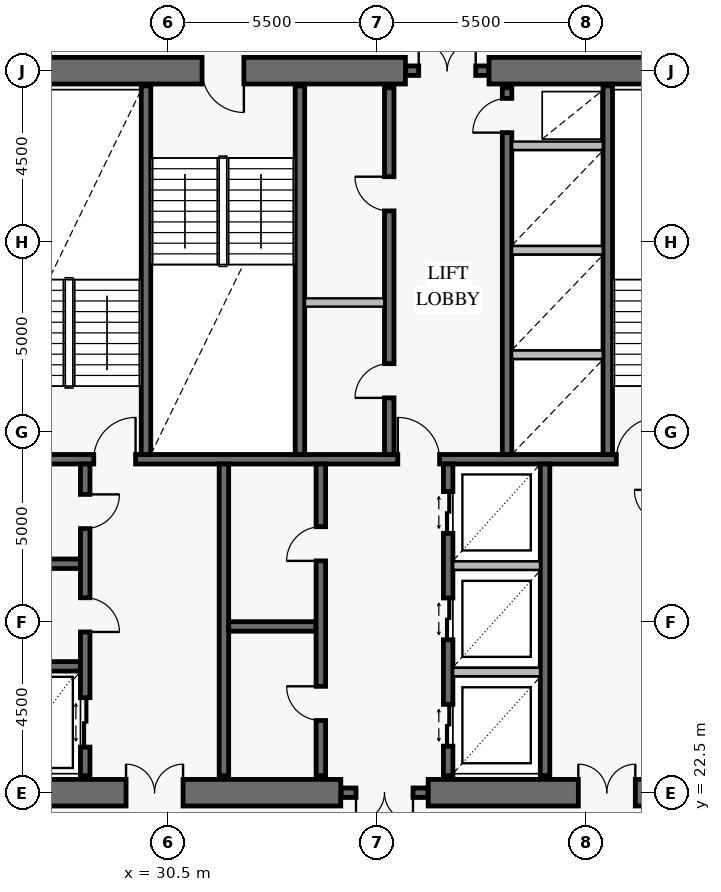
"""IFC4 building model, lengths in metres.
Left out: names, types, materials, properties, quantities, classifications, styles, units other than length and angle.
Written with IfcOpenShell. Run it as: python <this file> out.ifc"""

import sys

from ifc_helpers import new_model, si_unit, direction, frame, frame_2d, origin, place, context, subcontext, project, spatial, rectangle, extrude, element, fill, save


model = new_model("IFC4")
c1 = context("Model", 3, precision=1e-05, world=origin(), true_north=direction((0.0, 1.0)))
c2 = subcontext(c1, "Body", "Model", "MODEL_VIEW")
j1 = project(units=[si_unit("LENGTHUNIT", "METRE"), si_unit("PLANEANGLEUNIT", "RADIAN")], contexts=[c1])
p1 = place(None, origin())
s1 = spatial("IfcSite", under=j1, at=p1, CompositionType="ELEMENT")
p2 = place(p1, origin())
s2 = spatial("IfcBuilding", under=s1, at=p2, CompositionType="ELEMENT")
p3 = place(p2, frame((0.0, 0.0, 150.4)))
s3 = spatial("IfcBuildingStorey", under=s2, at=p3, CompositionType="ELEMENT", Elevation=150.4)
p4 = place(p3, frame((25.15, 22.5, 0.0), z_axis=(0.0, 0.0, 1.0), x_axis=(1.0, 0.0, 0.0)))
e1 = element("IfcWall", 1, at=p4, inside=s3, PredefinedType="SHEAR", context=c2, shape_type="SweptSolid", body=[
    extrude(rectangle(XDim=9.9, YDim=0.7, at=frame_2d((4.95, 0.0))), origin(), (0.0, 0.0, 1.0), 3.8),
])
p5 = place(p4, frame((4.25, 0.0, 0.0)))
e2 = element("IfcOpeningElement", 2, at=p5, cuts=e1, PredefinedType="OPENING", context=c2, shape_type="SweptSolid", body=[
    extrude(rectangle(XDim=1.5, YDim=2.15, at=frame_2d((0.75, 1.075))), frame((0.0, 0.362, 0.0), z_axis=(0.0, -1.0, 0.0), x_axis=(1.0, 0.0, 0.0)), (0.0, 0.0, 1.0), 0.724),
])
p6 = place(p3, frame((37.35, 22.5, 0.0), z_axis=(0.0, 0.0, 1.0), x_axis=(1.0, 0.0, 0.0)))
e3 = element("IfcWall", 3, at=p6, inside=s3, PredefinedType="SHEAR", context=c2, shape_type="SweptSolid", body=[
    extrude(rectangle(XDim=9.5, YDim=0.7, at=frame_2d((4.75, 0.0))), origin(), (0.0, 0.0, 1.0), 3.8),
])
p7 = place(p6, frame((3.95, 0.0, 0.0)))
e4 = element("IfcOpeningElement", 4, at=p7, cuts=e3, PredefinedType="OPENING", context=c2, shape_type="SweptSolid", body=[
    extrude(rectangle(XDim=1.5, YDim=2.15, at=frame_2d((0.75, 1.075))), frame((0.0, 0.362, 0.0), z_axis=(0.0, -1.0, 0.0), x_axis=(1.0, 0.0, 0.0)), (0.0, 0.0, 1.0), 0.724),
])
p8 = place(p3, frame((46.85, 41.5, 0.0), z_axis=(0.0, 0.0, 1.0), x_axis=(-1.0, 0.0, 0.0)))
e5 = element("IfcWall", 5, at=p8, inside=s3, PredefinedType="SHEAR", context=c2, shape_type="SweptSolid", body=[
    extrude(rectangle(XDim=7.9, YDim=0.7, at=frame_2d((3.95, 0.0))), origin(), (0.0, 0.0, 1.0), 3.8),
])
p9 = place(p3, frame((36.75, 41.5, 0.0), z_axis=(0.0, 0.0, 1.0), x_axis=(-1.0, 0.0, 0.0)))
e6 = element("IfcWall", 6, at=p9, inside=s3, PredefinedType="SHEAR", context=c2, shape_type="SweptSolid", body=[
    extrude(rectangle(XDim=11.6, YDim=0.7, at=frame_2d((5.8, 0.0))), origin(), (0.0, 0.0, 1.0), 3.8),
])
p10 = place(p9, frame((4.25, 0.0, 0.0)))
e7 = element("IfcOpeningElement", 7, at=p10, cuts=e6, PredefinedType="OPENING", context=c2, shape_type="SweptSolid", body=[
    extrude(rectangle(XDim=1.1, YDim=2.15, at=frame_2d((0.55, 1.075))), frame((0.0, 0.362, 0.0), z_axis=(0.0, -1.0, 0.0), x_axis=(1.0, 0.0, 0.0)), (0.0, 0.0, 1.0), 0.724),
])
p11 = place(p3, frame((35.06, 22.5, 0.0), z_axis=(0.0, 0.0, 1.0), x_axis=(1.0, 0.0, 0.0)))
e8 = element("IfcWall", 8, at=p11, inside=s3, PredefinedType="SOLIDWALL", context=c2, shape_type="SweptSolid", body=[
    extrude(rectangle(XDim=2.28, YDim=0.25, at=frame_2d((1.14, 0.0))), origin(), (0.0, 0.0, 1.0), 3.8),
])
p12 = place(p11, frame((0.39, 0.0, 0.0)))
e9 = element("IfcOpeningElement", 9, at=p12, cuts=e8, PredefinedType="OPENING", context=c2, shape_type="SweptSolid", body=[
    extrude(rectangle(XDim=1.5, YDim=2.15, at=frame_2d((0.75, 1.075))), frame((0.0, 0.137, 0.0), z_axis=(0.0, -1.0, 0.0), x_axis=(1.0, 0.0, 0.0)), (0.0, 0.0, 1.0), 0.274),
])
p13 = place(p3, frame((36.76, 41.5, 0.0), z_axis=(0.0, 0.0, 1.0), x_axis=(1.0, 0.0, 0.0)))
e10 = element("IfcWall", 10, at=p13, inside=s3, PredefinedType="SOLIDWALL", context=c2, shape_type="SweptSolid", body=[
    extrude(rectangle(XDim=2.18, YDim=0.25, at=frame_2d((1.09, 0.0))), origin(), (0.0, 0.0, 1.0), 3.8),
])
p14 = place(p13, frame((0.34, 0.0, 0.0)))
e11 = element("IfcOpeningElement", 11, at=p14, cuts=e10, PredefinedType="OPENING", context=c2, shape_type="SweptSolid", body=[
    extrude(rectangle(XDim=1.5, YDim=2.15, at=frame_2d((0.75, 1.075))), frame((0.0, 0.137, 0.0), z_axis=(0.0, -1.0, 0.0), x_axis=(1.0, 0.0, 0.0)), (0.0, 0.0, 1.0), 0.274),
])
p15 = place(p3, frame((25.95, 31.275, 0.0), z_axis=(0.0, 0.0, 1.0), x_axis=(1.0, 0.0, 0.0)))
e12 = element("IfcWall", 12, at=p15, inside=s3, PredefinedType="SOLIDWALL", context=c2, shape_type="SweptSolid", body=[
    extrude(rectangle(XDim=20.1, YDim=0.25, at=frame_2d((10.05, 0.0))), origin(), (0.0, 0.0, 1.0), 3.8),
])
p16 = place(p15, frame((2.6, 0.0, 0.0)))
e13 = element("IfcOpeningElement", 13, at=p16, cuts=e12, PredefinedType="OPENING", context=c2, shape_type="SweptSolid", body=[
    extrude(rectangle(XDim=1.1, YDim=2.15, at=frame_2d((0.55, 1.075))), frame((0.0, 0.137, 0.0), z_axis=(0.0, -1.0, 0.0), x_axis=(1.0, 0.0, 0.0)), (0.0, 0.0, 1.0), 0.274),
])
p17 = place(p15, frame((10.6, 0.0, 0.0)))
e14 = element("IfcOpeningElement", 14, at=p17, cuts=e12, PredefinedType="OPENING", context=c2, shape_type="SweptSolid", body=[
    extrude(rectangle(XDim=1.1, YDim=2.15, at=frame_2d((0.55, 1.075))), frame((0.0, 0.137, 0.0), z_axis=(0.0, -1.0, 0.0), x_axis=(1.0, 0.0, 0.0)), (0.0, 0.0, 1.0), 0.274),
])
p18 = place(p15, frame((16.35, 0.0, 0.0)))
e15 = element("IfcOpeningElement", 15, at=p18, cuts=e12, PredefinedType="OPENING", context=c2, shape_type="SweptSolid", body=[
    extrude(rectangle(XDim=1.1, YDim=2.15, at=frame_2d((0.55, 1.075))), frame((0.0, 0.137, 0.0), z_axis=(0.0, -1.0, 0.0), x_axis=(1.0, 0.0, 0.0)), (0.0, 0.0, 1.0), 0.274),
])
for number, where, z_axis, x_axis in (
    (16, (29.925, 31.4, 0.0), (0.0, 0.0, 1.0), (0.0, 1.0, 0.0)),
    (17, (33.975, 31.4, 0.0), (0.0, 0.0, 1.0), (0.0, 1.0, 0.0)),
    (18, (42.075, 31.4, 0.0), (0.0, 0.0, 1.0), (0.0, 1.0, 0.0)),
):
    element("IfcWall", number, at=place(p3, frame(where, z_axis=z_axis, x_axis=x_axis)), inside=s3, PredefinedType="SOLIDWALL", context=c2, shape_type="SweptSolid", body=[
        extrude(rectangle(XDim=9.7, YDim=0.25, at=frame_2d((4.85, 0.0))), origin(), (0.0, 0.0, 1.0), 3.8),
    ])
p19 = place(p3, frame((36.325, 31.4, 0.0), z_axis=(0.0, 0.0, 1.0), x_axis=(0.0, 1.0, 0.0)))
e19 = element("IfcWall", 19, at=p19, inside=s3, PredefinedType="SOLIDWALL", context=c2, shape_type="SweptSolid", body=[
    extrude(rectangle(XDim=9.65, YDim=0.25, at=frame_2d((4.825, 0.0))), origin(), (0.0, 0.0, 1.0), 3.8),
])
p20 = place(p19, frame((1.49, 0.0, 0.0)))
e20 = element("IfcOpeningElement", 20, at=p20, cuts=e19, PredefinedType="OPENING", context=c2, shape_type="SweptSolid", body=[
    extrude(rectangle(XDim=0.9, YDim=2.1, at=frame_2d((0.45, 1.05))), frame((0.0, 0.137, 0.0), z_axis=(0.0, -1.0, 0.0), x_axis=(1.0, 0.0, 0.0)), (0.0, 0.0, 1.0), 0.274),
])
p21 = place(p19, frame((6.41, 0.0, 0.0)))
e21 = element("IfcOpeningElement", 21, at=p21, cuts=e19, PredefinedType="OPENING", context=c2, shape_type="SweptSolid", body=[
    extrude(rectangle(XDim=0.9, YDim=2.1, at=frame_2d((0.45, 1.05))), frame((0.0, 0.137, 0.0), z_axis=(0.0, -1.0, 0.0), x_axis=(1.0, 0.0, 0.0)), (0.0, 0.0, 1.0), 0.274),
])
p22 = place(p3, frame((39.425, 31.4, 0.0), z_axis=(0.0, 0.0, 1.0), x_axis=(0.0, 1.0, 0.0)))
e22 = element("IfcWall", 22, at=p22, inside=s3, PredefinedType="SOLIDWALL", context=c2, shape_type="SweptSolid", body=[
    extrude(rectangle(XDim=9.65, YDim=0.25, at=frame_2d((4.825, 0.0))), origin(), (0.0, 0.0, 1.0), 3.8),
])
p23 = place(p22, frame((8.47, 0.0, 0.0)))
e23 = element("IfcOpeningElement", 23, at=p23, cuts=e22, PredefinedType="OPENING", context=c2, shape_type="SweptSolid", body=[
    extrude(rectangle(XDim=0.9, YDim=2.1, at=frame_2d((0.45, 1.05))), frame((0.0, 0.137, 0.0), z_axis=(0.0, -1.0, 0.0), x_axis=(1.0, 0.0, 0.0)), (0.0, 0.0, 1.0), 0.274),
])
for number, where, z_axis, x_axis in (
    (24, (25.95, 25.825, 0.0), (0.0, 0.0, 1.0), (1.0, 0.0, 0.0)),
    (25, (25.95, 28.525, 0.0), (0.0, 0.0, 1.0), (1.0, 0.0, 0.0)),
):
    element("IfcWall", number, at=place(p3, frame(where, z_axis=z_axis, x_axis=x_axis)), inside=s3, PredefinedType="SOLIDWALL", context=c2, shape_type="SweptSolid", body=[
        extrude(rectangle(XDim=2.25, YDim=0.25, at=frame_2d((1.125, 0.0))), origin(), (0.0, 0.0, 1.0), 3.8),
    ])
p24 = place(p3, frame((28.325, 22.95, 0.0), z_axis=(0.0, 0.0, 1.0), x_axis=(0.0, 1.0, 0.0)))
e26 = element("IfcWall", 26, at=p24, inside=s3, PredefinedType="SOLIDWALL", context=c2, shape_type="SweptSolid", body=[
    extrude(rectangle(XDim=8.2, YDim=0.25, at=frame_2d((4.1, 0.0))), origin(), (0.0, 0.0, 1.0), 3.8),
])
p25 = place(p24, frame((0.75, 0.0, 0.0)))
e27 = element("IfcOpeningElement", 27, at=p25, cuts=e26, PredefinedType="OPENING", context=c2, shape_type="SweptSolid", body=[
    extrude(rectangle(XDim=1.3, YDim=2.3, at=frame_2d((0.65, 1.15))), frame((0.0, 0.137, 0.0), z_axis=(0.0, -1.0, 0.0), x_axis=(1.0, 0.0, 0.0)), (0.0, 0.0, 1.0), 0.274),
])
p26 = place(p24, frame((3.78, 0.0, 0.0)))
e28 = element("IfcOpeningElement", 28, at=p26, cuts=e26, PredefinedType="OPENING", context=c2, shape_type="SweptSolid", body=[
    extrude(rectangle(XDim=0.9, YDim=2.1, at=frame_2d((0.45, 1.05))), frame((0.0, 0.137, 0.0), z_axis=(0.0, -1.0, 0.0), x_axis=(1.0, 0.0, 0.0)), (0.0, 0.0, 1.0), 0.274),
])
p27 = place(p24, frame((6.5, 0.0, 0.0)))
e29 = element("IfcOpeningElement", 29, at=p27, cuts=e26, PredefinedType="OPENING", context=c2, shape_type="SweptSolid", body=[
    extrude(rectangle(XDim=0.9, YDim=2.1, at=frame_2d((0.45, 1.05))), frame((0.0, 0.137, 0.0), z_axis=(0.0, -1.0, 0.0), x_axis=(1.0, 0.0, 0.0)), (0.0, 0.0, 1.0), 0.274),
])
p28 = place(p3, frame((31.975, 22.95, 0.0), z_axis=(0.0, 0.0, 1.0), x_axis=(0.0, 1.0, 0.0)))
e30 = element("IfcWall", 30, at=p28, inside=s3, PredefinedType="SOLIDWALL", context=c2, shape_type="SweptSolid", body=[
    extrude(rectangle(XDim=8.2, YDim=0.25, at=frame_2d((4.1, 0.0))), origin(), (0.0, 0.0, 1.0), 3.8),
])
p29 = place(p3, frame((32.1, 26.875, 0.0), z_axis=(0.0, 0.0, 1.0), x_axis=(1.0, 0.0, 0.0)))
e31 = element("IfcWall", 31, at=p29, inside=s3, PredefinedType="SOLIDWALL", context=c2, shape_type="SweptSolid", body=[
    extrude(rectangle(XDim=2.3, YDim=0.25, at=frame_2d((1.15, 0.0))), origin(), (0.0, 0.0, 1.0), 3.8),
])
p30 = place(p3, frame((34.525, 22.95, 0.0), z_axis=(0.0, 0.0, 1.0), x_axis=(0.0, 1.0, 0.0)))
e32 = element("IfcWall", 32, at=p30, inside=s3, PredefinedType="SOLIDWALL", context=c2, shape_type="SweptSolid", body=[
    extrude(rectangle(XDim=8.2, YDim=0.25, at=frame_2d((4.1, 0.0))), origin(), (0.0, 0.0, 1.0), 3.8),
])
p31 = place(p30, frame((1.45, 0.0, 0.0)))
e33 = element("IfcOpeningElement", 33, at=p31, cuts=e32, PredefinedType="OPENING", context=c2, shape_type="SweptSolid", body=[
    extrude(rectangle(XDim=0.9, YDim=2.1, at=frame_2d((0.45, 1.05))), frame((0.0, 0.137, 0.0), z_axis=(0.0, -1.0, 0.0), x_axis=(1.0, 0.0, 0.0)), (0.0, 0.0, 1.0), 0.274),
])
p32 = place(p30, frame((5.65, 0.0, 0.0)))
e34 = element("IfcOpeningElement", 34, at=p32, cuts=e32, PredefinedType="OPENING", context=c2, shape_type="SweptSolid", body=[
    extrude(rectangle(XDim=0.9, YDim=2.1, at=frame_2d((0.45, 1.05))), frame((0.0, 0.137, 0.0), z_axis=(0.0, -1.0, 0.0), x_axis=(1.0, 0.0, 0.0)), (0.0, 0.0, 1.0), 0.274),
])
p33 = place(p3, frame((37.875, 22.95, 0.0), z_axis=(0.0, 0.0, 1.0), x_axis=(0.0, 1.0, 0.0)))
e35 = element("IfcWall", 35, at=p33, inside=s3, PredefinedType="SOLIDWALL", context=c2, shape_type="SweptSolid", body=[
    extrude(rectangle(XDim=8.2, YDim=0.25, at=frame_2d((4.1, 0.0))), origin(), (0.0, 0.0, 1.0), 3.8),
])
p34 = place(p33, frame((0.775, 0.0, 0.0)))
e36 = element("IfcOpeningElement", 36, at=p34, cuts=e35, PredefinedType="OPENING", context=c2, shape_type="SweptSolid", body=[
    extrude(rectangle(XDim=1.1, YDim=2.2, at=frame_2d((0.55, 1.1))), frame((0.0, 0.137, 0.0), z_axis=(0.0, -1.0, 0.0), x_axis=(1.0, 0.0, 0.0)), (0.0, 0.0, 1.0), 0.274),
])
p35 = place(p33, frame((3.575, 0.0, 0.0)))
e37 = element("IfcOpeningElement", 37, at=p35, cuts=e35, PredefinedType="OPENING", context=c2, shape_type="SweptSolid", body=[
    extrude(rectangle(XDim=1.1, YDim=2.2, at=frame_2d((0.55, 1.1))), frame((0.0, 0.137, 0.0), z_axis=(0.0, -1.0, 0.0), x_axis=(1.0, 0.0, 0.0)), (0.0, 0.0, 1.0), 0.274),
])
p36 = place(p33, frame((6.375, 0.0, 0.0)))
e38 = element("IfcOpeningElement", 38, at=p36, cuts=e35, PredefinedType="OPENING", context=c2, shape_type="SweptSolid", body=[
    extrude(rectangle(XDim=1.1, YDim=2.2, at=frame_2d((0.55, 1.1))), frame((0.0, 0.137, 0.0), z_axis=(0.0, -1.0, 0.0), x_axis=(1.0, 0.0, 0.0)), (0.0, 0.0, 1.0), 0.274),
])
p37 = place(p3, frame((40.425, 22.95, 0.0), z_axis=(0.0, 0.0, 1.0), x_axis=(0.0, 1.0, 0.0)))
e39 = element("IfcWall", 39, at=p37, inside=s3, PredefinedType="SOLIDWALL", context=c2, shape_type="SweptSolid", body=[
    extrude(rectangle(XDim=8.2, YDim=0.25, at=frame_2d((4.1, 0.0))), origin(), (0.0, 0.0, 1.0), 3.8),
])
p38 = place(p3, frame((34.108, 35.4, 0.0), z_axis=(0.0, 0.0, 1.0), x_axis=(1.0, 0.0, 0.0)))
e40 = element("IfcWall", 40, at=p38, inside=s3, PredefinedType="PARTITIONING", context=c2, shape_type="SweptSolid", body=[
    extrude(rectangle(XDim=2.084, YDim=0.22, at=frame_2d((1.042, 0.0))), origin(), (0.0, 0.0, 1.0), 3.55),
])
for number, where, z_axis, x_axis in (
    (41, (39.558, 34.025, 0.0), (0.0, 0.0, 1.0), (1.0, 0.0, 0.0)),
    (42, (39.558, 36.775, 0.0), (0.0, 0.0, 1.0), (1.0, 0.0, 0.0)),
    (43, (39.558, 39.525, 0.0), (0.0, 0.0, 1.0), (1.0, 0.0, 0.0)),
):
    element("IfcWall", number, at=place(p3, frame(where, z_axis=z_axis, x_axis=x_axis)), inside=s3, PredefinedType="PARTITIONING", context=c2, shape_type="SweptSolid", body=[
        extrude(rectangle(XDim=2.384, YDim=0.22, at=frame_2d((1.192, 0.0))), origin(), (0.0, 0.0, 1.0), 3.55),
    ])
for number, where, z_axis, x_axis in (
    (44, (38.008, 25.675, 0.0), (0.0, 0.0, 1.0), (1.0, 0.0, 0.0)),
    (45, (38.008, 28.475, 0.0), (0.0, 0.0, 1.0), (1.0, 0.0, 0.0)),
):
    element("IfcWall", number, at=place(p3, frame(where, z_axis=z_axis, x_axis=x_axis)), inside=s3, PredefinedType="PARTITIONING", context=c2, shape_type="SweptSolid", body=[
        extrude(rectangle(XDim=2.284, YDim=0.22, at=frame_2d((1.142, 0.0))), origin(), (0.0, 0.0, 1.0), 3.55),
    ])
p39 = place(p10, origin())
e46 = element("IfcDoor", 46, at=p39, inside=s3, OperationType="SINGLE_SWING_LEFT", PredefinedType="USERDEFINED", context=c2, shape_type="SweptSolid", body=[
    extrude(rectangle(XDim=1.1, YDim=2.15, at=frame_2d((0.55, 1.075))), frame((0.0, 0.025, 0.0), z_axis=(0.0, -1.0, 0.0), x_axis=(1.0, 0.0, 0.0)), (0.0, 0.0, 1.0), 0.05),
])
fill(e7, e46)
p40 = place(p5, origin())
e47 = element("IfcDoor", 47, at=p40, inside=s3, OperationType="DOUBLE_DOOR_SINGLE_SWING", PredefinedType="DOOR", context=c2, shape_type="SweptSolid", body=[
    extrude(rectangle(XDim=1.5, YDim=2.15, at=frame_2d((0.75, 1.075))), frame((0.0, 0.025, 0.0), z_axis=(0.0, -1.0, 0.0), x_axis=(1.0, 0.0, 0.0)), (0.0, 0.0, 1.0), 0.05),
])
fill(e2, e47)
p41 = place(p7, origin())
e48 = element("IfcDoor", 48, at=p41, inside=s3, OperationType="DOUBLE_DOOR_SINGLE_SWING", PredefinedType="DOOR", context=c2, shape_type="SweptSolid", body=[
    extrude(rectangle(XDim=1.5, YDim=2.15, at=frame_2d((0.75, 1.075))), frame((0.0, 0.025, 0.0), z_axis=(0.0, -1.0, 0.0), x_axis=(1.0, 0.0, 0.0)), (0.0, 0.0, 1.0), 0.05),
])
fill(e4, e48)
p42 = place(p12, frame((1.5, 0.0, 0.0), z_axis=(0.0, 0.0, 1.0), x_axis=(-1.0, 0.0, 0.0)))
e49 = element("IfcDoor", 49, at=p42, inside=s3, OperationType="DOUBLE_DOOR_SINGLE_SWING", PredefinedType="DOOR", context=c2, shape_type="SweptSolid", body=[
    extrude(rectangle(XDim=1.5, YDim=2.15, at=frame_2d((0.75, 1.075))), frame((0.0, 0.025, 0.0), z_axis=(0.0, -1.0, 0.0), x_axis=(1.0, 0.0, 0.0)), (0.0, 0.0, 1.0), 0.05),
])
fill(e9, e49)
p43 = place(p14, origin())
e50 = element("IfcDoor", 50, at=p43, inside=s3, OperationType="DOUBLE_DOOR_SINGLE_SWING", PredefinedType="DOOR", context=c2, shape_type="SweptSolid", body=[
    extrude(rectangle(XDim=1.5, YDim=2.15, at=frame_2d((0.75, 1.075))), frame((0.0, 0.025, 0.0), z_axis=(0.0, -1.0, 0.0), x_axis=(1.0, 0.0, 0.0)), (0.0, 0.0, 1.0), 0.05),
])
fill(e11, e50)
p44 = place(p16, origin())
e51 = element("IfcDoor", 51, at=p44, inside=s3, OperationType="SINGLE_SWING_RIGHT", PredefinedType="USERDEFINED", context=c2, shape_type="SweptSolid", body=[
    extrude(rectangle(XDim=1.1, YDim=2.15, at=frame_2d((0.55, 1.075))), frame((0.0, 0.025, 0.0), z_axis=(0.0, -1.0, 0.0), x_axis=(1.0, 0.0, 0.0)), (0.0, 0.0, 1.0), 0.05),
])
fill(e13, e51)
p45 = place(p17, origin())
e52 = element("IfcDoor", 52, at=p45, inside=s3, OperationType="SINGLE_SWING_LEFT", PredefinedType="USERDEFINED", context=c2, shape_type="SweptSolid", body=[
    extrude(rectangle(XDim=1.1, YDim=2.15, at=frame_2d((0.55, 1.075))), frame((0.0, 0.025, 0.0), z_axis=(0.0, -1.0, 0.0), x_axis=(1.0, 0.0, 0.0)), (0.0, 0.0, 1.0), 0.05),
])
fill(e14, e52)
p46 = place(p18, origin())
e53 = element("IfcDoor", 53, at=p46, inside=s3, OperationType="SINGLE_SWING_RIGHT", PredefinedType="USERDEFINED", context=c2, shape_type="SweptSolid", body=[
    extrude(rectangle(XDim=1.1, YDim=2.15, at=frame_2d((0.55, 1.075))), frame((0.0, 0.025, 0.0), z_axis=(0.0, -1.0, 0.0), x_axis=(1.0, 0.0, 0.0)), (0.0, 0.0, 1.0), 0.05),
])
fill(e15, e53)
p47 = place(p20, origin())
e54 = element("IfcDoor", 54, at=p47, inside=s3, OperationType="SINGLE_SWING_LEFT", PredefinedType="DOOR", context=c2, shape_type="SweptSolid", body=[
    extrude(rectangle(XDim=0.9, YDim=2.1, at=frame_2d((0.45, 1.05))), frame((0.0, 0.025, 0.0), z_axis=(0.0, -1.0, 0.0), x_axis=(1.0, 0.0, 0.0)), (0.0, 0.0, 1.0), 0.05),
])
fill(e20, e54)
p48 = place(p21, origin())
e55 = element("IfcDoor", 55, at=p48, inside=s3, OperationType="SINGLE_SWING_RIGHT", PredefinedType="DOOR", context=c2, shape_type="SweptSolid", body=[
    extrude(rectangle(XDim=0.9, YDim=2.1, at=frame_2d((0.45, 1.05))), frame((0.0, 0.025, 0.0), z_axis=(0.0, -1.0, 0.0), x_axis=(1.0, 0.0, 0.0)), (0.0, 0.0, 1.0), 0.05),
])
fill(e21, e55)
p49 = place(p23, origin())
e56 = element("IfcDoor", 56, at=p49, inside=s3, OperationType="SINGLE_SWING_LEFT", PredefinedType="DOOR", context=c2, shape_type="SweptSolid", body=[
    extrude(rectangle(XDim=0.9, YDim=2.1, at=frame_2d((0.45, 1.05))), frame((0.0, 0.025, 0.0), z_axis=(0.0, -1.0, 0.0), x_axis=(1.0, 0.0, 0.0)), (0.0, 0.0, 1.0), 0.05),
])
fill(e23, e56)
p50 = place(p25, frame((1.3, 0.0, 0.0), z_axis=(0.0, 0.0, 1.0), x_axis=(-1.0, 0.0, 0.0)))
e57 = element("IfcDoor", 57, at=p50, inside=s3, OperationType="DOUBLE_DOOR_SLIDING", PredefinedType="DOOR", context=c2, shape_type="SweptSolid", body=[
    extrude(rectangle(XDim=1.3, YDim=2.3, at=frame_2d((0.65, 1.15))), frame((0.0, 0.025, 0.0), z_axis=(0.0, -1.0, 0.0), x_axis=(1.0, 0.0, 0.0)), (0.0, 0.0, 1.0), 0.05),
])
fill(e27, e57)
p51 = place(p26, frame((0.9, 0.0, 0.0), z_axis=(0.0, 0.0, 1.0), x_axis=(-1.0, 0.0, 0.0)))
e58 = element("IfcDoor", 58, at=p51, inside=s3, OperationType="SINGLE_SWING_RIGHT", PredefinedType="DOOR", context=c2, shape_type="SweptSolid", body=[
    extrude(rectangle(XDim=0.9, YDim=2.1, at=frame_2d((0.45, 1.05))), frame((0.0, 0.025, 0.0), z_axis=(0.0, -1.0, 0.0), x_axis=(1.0, 0.0, 0.0)), (0.0, 0.0, 1.0), 0.05),
])
fill(e28, e58)
p52 = place(p27, frame((0.9, 0.0, 0.0), z_axis=(0.0, 0.0, 1.0), x_axis=(-1.0, 0.0, 0.0)))
e59 = element("IfcDoor", 59, at=p52, inside=s3, OperationType="SINGLE_SWING_LEFT", PredefinedType="DOOR", context=c2, shape_type="SweptSolid", body=[
    extrude(rectangle(XDim=0.9, YDim=2.1, at=frame_2d((0.45, 1.05))), frame((0.0, 0.025, 0.0), z_axis=(0.0, -1.0, 0.0), x_axis=(1.0, 0.0, 0.0)), (0.0, 0.0, 1.0), 0.05),
])
fill(e29, e59)
p53 = place(p31, origin())
e60 = element("IfcDoor", 60, at=p53, inside=s3, OperationType="SINGLE_SWING_RIGHT", PredefinedType="DOOR", context=c2, shape_type="SweptSolid", body=[
    extrude(rectangle(XDim=0.9, YDim=2.1, at=frame_2d((0.45, 1.05))), frame((0.0, 0.025, 0.0), z_axis=(0.0, -1.0, 0.0), x_axis=(1.0, 0.0, 0.0)), (0.0, 0.0, 1.0), 0.05),
])
fill(e33, e60)
p54 = place(p32, origin())
e61 = element("IfcDoor", 61, at=p54, inside=s3, OperationType="SINGLE_SWING_LEFT", PredefinedType="DOOR", context=c2, shape_type="SweptSolid", body=[
    extrude(rectangle(XDim=0.9, YDim=2.1, at=frame_2d((0.45, 1.05))), frame((0.0, 0.025, 0.0), z_axis=(0.0, -1.0, 0.0), x_axis=(1.0, 0.0, 0.0)), (0.0, 0.0, 1.0), 0.05),
])
fill(e34, e61)
p55 = place(p34, origin())
e62 = element("IfcDoor", 62, at=p55, inside=s3, OperationType="DOUBLE_DOOR_SLIDING", PredefinedType="DOOR", context=c2, shape_type="SweptSolid", body=[
    extrude(rectangle(XDim=1.1, YDim=2.2, at=frame_2d((0.55, 1.1))), frame((0.0, 0.025, 0.0), z_axis=(0.0, -1.0, 0.0), x_axis=(1.0, 0.0, 0.0)), (0.0, 0.0, 1.0), 0.05),
])
fill(e36, e62)
p56 = place(p35, origin())
e63 = element("IfcDoor", 63, at=p56, inside=s3, OperationType="DOUBLE_DOOR_SLIDING", PredefinedType="DOOR", context=c2, shape_type="SweptSolid", body=[
    extrude(rectangle(XDim=1.1, YDim=2.2, at=frame_2d((0.55, 1.1))), frame((0.0, 0.025, 0.0), z_axis=(0.0, -1.0, 0.0), x_axis=(1.0, 0.0, 0.0)), (0.0, 0.0, 1.0), 0.05),
])
fill(e37, e63)
p57 = place(p36, origin())
e64 = element("IfcDoor", 64, at=p57, inside=s3, OperationType="DOUBLE_DOOR_SLIDING", PredefinedType="DOOR", context=c2, shape_type="SweptSolid", body=[
    extrude(rectangle(XDim=1.1, YDim=2.2, at=frame_2d((0.55, 1.1))), frame((0.0, 0.025, 0.0), z_axis=(0.0, -1.0, 0.0), x_axis=(1.0, 0.0, 0.0)), (0.0, 0.0, 1.0), 0.05),
])
fill(e38, e64)
save(model, sys.argv[1])
